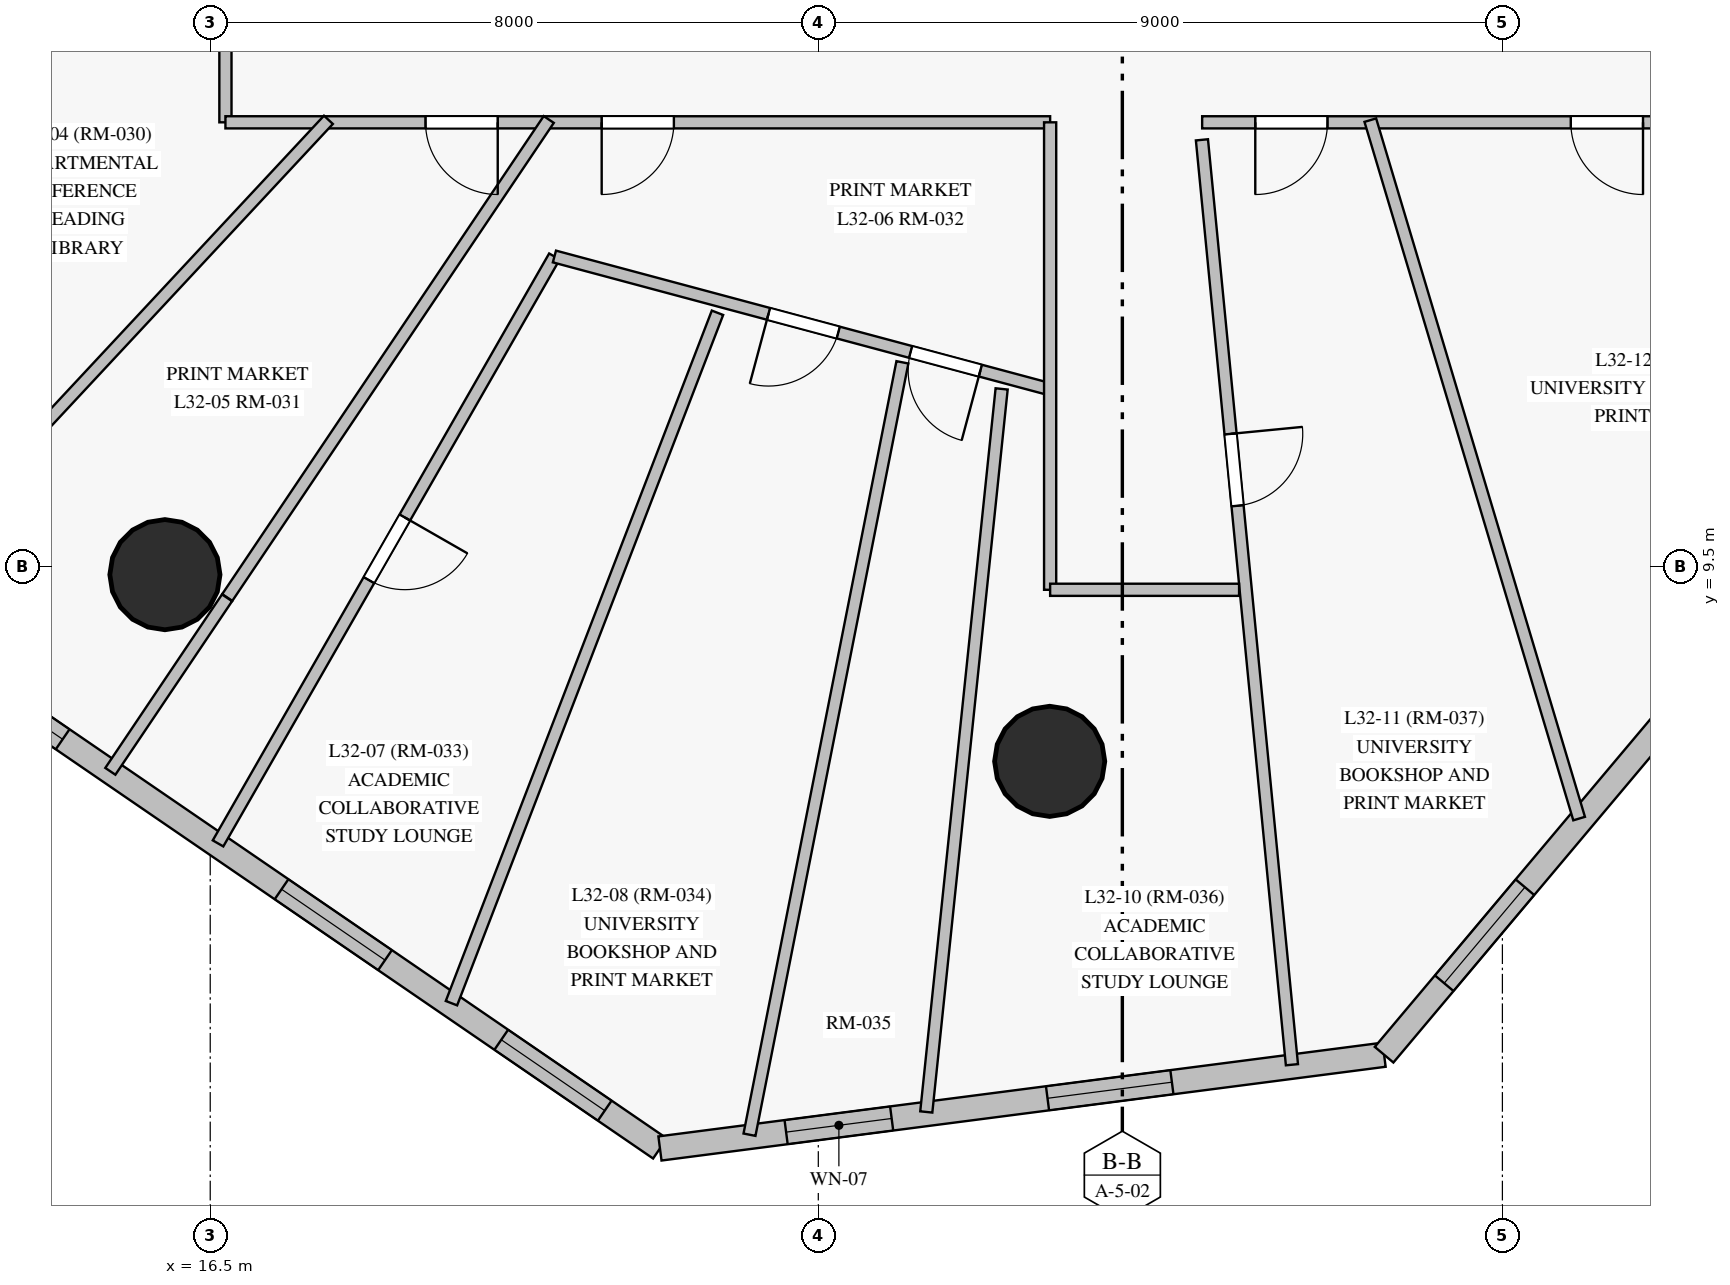
"""IFC4 building model, lengths in metres.
Left out: names, types, materials, properties, quantities, classifications, styles, units other than length and angle.
Written with IfcOpenShell. Run it as: python <this file> out.ifc"""

import sys

from ifc_helpers import new_model, si_unit, direction, frame, frame_2d, origin, origin_with_axes, origin_2d, place, context, subcontext, project, spatial, rectangle, circle, extrude, source, transform, mapped, element, fill, save


model = new_model("IFC4")
c1 = context("Model", 3, precision=1e-05, world=origin(), true_north=direction((0.0, 1.0)))
c2 = subcontext(c1, "Body", "Model", "MODEL_VIEW")
j1 = project(units=[si_unit("LENGTHUNIT", "METRE"), si_unit("PLANEANGLEUNIT", "RADIAN")], contexts=[c1])
p1 = place(None, origin())
s1 = spatial("IfcSite", under=j1, at=p1, CompositionType="ELEMENT")
p2 = place(p1, origin())
s2 = spatial("IfcBuilding", under=s1, at=p2, CompositionType="ELEMENT")
p3 = place(p2, frame((0.0, 0.0, 117.55)))
s3 = spatial("IfcBuildingStorey", under=s2, at=p3, CompositionType="ELEMENT", Elevation=117.55)
m1 = source(origin_with_axes(), c2, "Body", "SweptSolid", [
    extrude(circle(Radius=0.725, at=origin_2d()), origin(), (0.0, 0.0, 1.0), 3.05),
])
for number, where, z_axis, x_axis in (
    (1, (15.904, 9.399, 0.0), (0.0, 0.0, 1.0), (1.0, 0.0, 0.0)),
    (2, (27.544, 6.943, 0.0), (0.0, 0.0, 1.0), (1.0, 0.0, 0.0)),
):
    element("IfcColumn", number, at=place(p3, frame(where, z_axis=z_axis, x_axis=x_axis)), inside=s3, PredefinedType="COLUMN", context=c2, shape_type="MappedRepresentation", body=[
        mapped(m1, transform((0.0, 0.0, 0.0), scale=1.0)),
    ])
p4 = place(p3, frame((12.525, 8.627, 0.0), z_axis=(0.0, 0.0, 1.0), x_axis=(0.824983002795, -0.565157540071, 0.0)))
e3 = element("IfcWall", 3, at=p4, inside=s3, PredefinedType="SOLIDWALL", context=c2, shape_type="SweptSolid", body=[
    extrude(rectangle(XDim=11.991, YDim=0.32, at=frame_2d((5.995, 0.0))), origin(), (0.0, 0.0, 1.0), 2.825),
])
p5 = place(p4, frame((0.815, 0.0, 0.85)))
e4 = element("IfcOpeningElement", 4, at=p5, cuts=e3, PredefinedType="OPENING", context=c2, shape_type="SweptSolid", body=[
    extrude(rectangle(XDim=1.65, YDim=1.65, at=frame_2d((0.825, 0.825))), frame((0.0, 0.17, 0.0), z_axis=(0.0, -1.0, 0.0), x_axis=(1.0, 0.0, 0.0)), (0.0, 0.0, 1.0), 0.34),
])
p6 = place(p4, frame((5.956, 0.0, 0.85)))
e5 = element("IfcOpeningElement", 5, at=p6, cuts=e3, PredefinedType="OPENING", context=c2, shape_type="SweptSolid", body=[
    extrude(rectangle(XDim=1.65, YDim=1.65, at=frame_2d((0.825, 0.825))), frame((0.0, 0.17, 0.0), z_axis=(0.0, -1.0, 0.0), x_axis=(1.0, 0.0, 0.0)), (0.0, 0.0, 1.0), 0.34),
])
p7 = place(p4, frame((9.46, 0.0, 0.85)))
e6 = element("IfcOpeningElement", 6, at=p7, cuts=e3, PredefinedType="OPENING", context=c2, shape_type="SweptSolid", body=[
    extrude(rectangle(XDim=1.65, YDim=1.65, at=frame_2d((0.825, 0.825))), frame((0.0, 0.17, 0.0), z_axis=(0.0, -1.0, 0.0), x_axis=(1.0, 0.0, 0.0)), (0.0, 0.0, 1.0), 0.34),
])
p8 = place(p3, frame((22.417, 1.85, 0.0), z_axis=(0.0, 0.0, 1.0), x_axis=(0.991723253877, 0.128393877264, 0.0)))
e7 = element("IfcWall", 7, at=p8, inside=s3, PredefinedType="SOLIDWALL", context=c2, shape_type="SweptSolid", body=[
    extrude(rectangle(XDim=9.606, YDim=0.32, at=frame_2d((4.803, 0.0))), origin(), (0.0, 0.0, 1.0), 2.825),
])
p9 = place(p8, frame((1.674, 0.0, 0.85)))
e8 = element("IfcOpeningElement", 8, at=p9, cuts=e7, PredefinedType="OPENING", context=c2, shape_type="SweptSolid", body=[
    extrude(rectangle(XDim=1.4, YDim=1.65, at=frame_2d((0.7, 0.825))), frame((0.0, 0.17, 0.0), z_axis=(0.0, -1.0, 0.0), x_axis=(1.0, 0.0, 0.0)), (0.0, 0.0, 1.0), 0.34),
])
p10 = place(p8, frame((5.141, 0.0, 0.85)))
e9 = element("IfcOpeningElement", 9, at=p10, cuts=e7, PredefinedType="OPENING", context=c2, shape_type="SweptSolid", body=[
    extrude(rectangle(XDim=1.65, YDim=1.65, at=frame_2d((0.825, 0.825))), frame((0.0, 0.17, 0.0), z_axis=(0.0, -1.0, 0.0), x_axis=(1.0, 0.0, 0.0)), (0.0, 0.0, 1.0), 0.34),
])
p11 = place(p3, frame((31.944, 3.083, 0.0), z_axis=(0.0, 0.0, 1.0), x_axis=(0.643621916948, 0.765343601283, 0.0)))
e10 = element("IfcWall", 10, at=p11, inside=s3, PredefinedType="SOLIDWALL", context=c2, shape_type="SweptSolid", body=[
    extrude(rectangle(XDim=14.343, YDim=0.32, at=frame_2d((7.171, 0.0))), origin(), (0.0, 0.0, 1.0), 2.825),
])
p12 = place(p11, frame((1.229, 0.0, 0.85)))
e11 = element("IfcOpeningElement", 11, at=p12, cuts=e10, PredefinedType="OPENING", context=c2, shape_type="SweptSolid", body=[
    extrude(rectangle(XDim=1.65, YDim=1.65, at=frame_2d((0.825, 0.825))), frame((0.0, 0.17, 0.0), z_axis=(0.0, -1.0, 0.0), x_axis=(1.0, 0.0, 0.0)), (0.0, 0.0, 1.0), 0.34),
])
p13 = place(p11, frame((5.942, 0.0, 0.85)))
e12 = element("IfcOpeningElement", 12, at=p13, cuts=e10, PredefinedType="OPENING", context=c2, shape_type="SweptSolid", body=[
    extrude(rectangle(XDim=1.65, YDim=1.65, at=frame_2d((0.825, 0.825))), frame((0.0, 0.17, 0.0), z_axis=(0.0, -1.0, 0.0), x_axis=(1.0, 0.0, 0.0)), (0.0, 0.0, 1.0), 0.34),
])
p14 = place(p11, frame((10.739, 0.0, 0.85)))
e13 = element("IfcOpeningElement", 13, at=p14, cuts=e10, PredefinedType="OPENING", context=c2, shape_type="SweptSolid", body=[
    extrude(rectangle(XDim=1.65, YDim=1.65, at=frame_2d((0.825, 0.825))), frame((0.0, 0.17, 0.0), z_axis=(0.0, -1.0, 0.0), x_axis=(1.0, 0.0, 0.0)), (0.0, 0.0, 1.0), 0.34),
])
p15 = place(p3, frame((16.7, 15.35, 0.0), z_axis=(0.0, 0.0, 1.0), x_axis=(0.0, 1.0, 0.0)))
e14 = element("IfcWall", 14, at=p15, inside=s3, PredefinedType="PARTITIONING", context=c2, shape_type="SweptSolid", body=[
    extrude(rectangle(XDim=22.3, YDim=0.16, at=frame_2d((11.15, 0.0))), origin(), (0.0, 0.0, 1.0), 2.225),
])
p16 = place(p15, frame((10.675, 0.0, 0.0)))
e15 = element("IfcOpeningElement", 15, at=p16, cuts=e14, PredefinedType="OPENING", context=c2, shape_type="SweptSolid", body=[
    extrude(rectangle(XDim=0.95, YDim=2.15, at=frame_2d((0.475, 1.075))), frame((0.0, 0.09, 0.0), z_axis=(0.0, -1.0, 0.0), x_axis=(1.0, 0.0, 0.0)), (0.0, 0.0, 1.0), 0.18),
])
p17 = place(p15, frame((0.963, 0.0, 0.0)))
e16 = element("IfcOpeningElement", 16, at=p17, cuts=e14, PredefinedType="OPENING", context=c2, shape_type="SweptSolid", body=[
    extrude(rectangle(XDim=0.95, YDim=2.15, at=frame_2d((0.475, 1.075))), frame((0.0, 0.09, 0.0), z_axis=(0.0, -1.0, 0.0), x_axis=(1.0, 0.0, 0.0)), (0.0, 0.0, 1.0), 0.18),
])
p18 = place(p15, frame((14.02, 0.0, 0.0)))
e17 = element("IfcOpeningElement", 17, at=p18, cuts=e14, PredefinedType="OPENING", context=c2, shape_type="SweptSolid", body=[
    extrude(rectangle(XDim=0.95, YDim=2.15, at=frame_2d((0.475, 1.075))), frame((0.0, 0.09, 0.0), z_axis=(0.0, -1.0, 0.0), x_axis=(1.0, 0.0, 0.0)), (0.0, 0.0, 1.0), 0.18),
])
p19 = place(p3, frame((29.547, 15.12, 0.0), z_axis=(0.0, 0.0, 1.0), x_axis=(0.096855822721, -0.995298422387, 0.0)))
e18 = element("IfcWall", 18, at=p19, inside=s3, PredefinedType="PARTITIONING", context=c2, shape_type="SweptSolid", body=[
    extrude(rectangle(XDim=12.225, YDim=0.16, at=frame_2d((6.113, 0.0))), origin(), (0.0, 0.0, 1.0), 2.825),
])
p20 = place(p19, frame((3.887, 0.0, 0.0)))
e19 = element("IfcOpeningElement", 19, at=p20, cuts=e18, PredefinedType="OPENING", context=c2, shape_type="SweptSolid", body=[
    extrude(rectangle(XDim=0.95, YDim=2.15, at=frame_2d((0.475, 1.075))), frame((0.0, 0.09, 0.0), z_axis=(0.0, -1.0, 0.0), x_axis=(1.0, 0.0, 0.0)), (0.0, 0.0, 1.0), 0.18),
])
p21 = place(p3, frame((27.55, 15.35, 0.0), z_axis=(0.0, 0.0, 1.0), x_axis=(-1.0, 0.0, 0.0)))
e20 = element("IfcWall", 20, at=p21, inside=s3, PredefinedType="PARTITIONING", context=c2, shape_type="SweptSolid", body=[
    extrude(rectangle(XDim=10.85, YDim=0.16, at=frame_2d((5.425, 0.0))), origin(), (0.0, 0.0, 1.0), 2.325),
])
p22 = place(p21, frame((7.268, 0.0, 0.0)))
e21 = element("IfcOpeningElement", 21, at=p22, cuts=e20, PredefinedType="OPENING", context=c2, shape_type="SweptSolid", body=[
    extrude(rectangle(XDim=0.95, YDim=2.15, at=frame_2d((0.475, 1.075))), frame((0.0, 0.09, 0.0), z_axis=(0.0, -1.0, 0.0), x_axis=(1.0, 0.0, 0.0)), (0.0, 0.0, 1.0), 0.18),
])
p23 = place(p21, frame((4.95, 0.0, 0.0)))
e22 = element("IfcOpeningElement", 22, at=p23, cuts=e20, PredefinedType="OPENING", context=c2, shape_type="SweptSolid", body=[
    extrude(rectangle(XDim=0.95, YDim=2.15, at=frame_2d((0.475, 1.075))), frame((0.0, 0.09, 0.0), z_axis=(0.0, -1.0, 0.0), x_axis=(1.0, 0.0, 0.0)), (0.0, 0.0, 1.0), 0.18),
])
p24 = place(p3, frame((40.2, 15.35, 0.0), z_axis=(0.0, 0.0, 1.0), x_axis=(-1.0, 0.0, 0.0)))
e23 = element("IfcWall", 23, at=p24, inside=s3, PredefinedType="PARTITIONING", context=c2, shape_type="SweptSolid", body=[
    extrude(rectangle(XDim=10.65, YDim=0.16, at=frame_2d((5.325, 0.0))), origin(), (0.0, 0.0, 1.0), 2.225),
])
p25 = place(p24, frame((9.001, 0.0, 0.0)))
e24 = element("IfcOpeningElement", 24, at=p25, cuts=e23, PredefinedType="OPENING", context=c2, shape_type="SweptSolid", body=[
    extrude(rectangle(XDim=0.95, YDim=2.15, at=frame_2d((0.475, 1.075))), frame((0.0, 0.09, 0.0), z_axis=(0.0, -1.0, 0.0), x_axis=(1.0, 0.0, 0.0)), (0.0, 0.0, 1.0), 0.18),
])
p26 = place(p24, frame((4.85, 0.0, 0.0)))
e25 = element("IfcOpeningElement", 25, at=p26, cuts=e23, PredefinedType="OPENING", context=c2, shape_type="SweptSolid", body=[
    extrude(rectangle(XDim=0.95, YDim=2.15, at=frame_2d((0.475, 1.075))), frame((0.0, 0.09, 0.0), z_axis=(0.0, -1.0, 0.0), x_axis=(1.0, 0.0, 0.0)), (0.0, 0.0, 1.0), 0.18),
])
p27 = place(p3, frame((25.606, 12.193, 0.0), z_axis=(0.0, 0.0, 1.0), x_axis=(-0.194207590837, -0.980960453668, 0.0)))
e26 = element("IfcWall", 26, at=p27, inside=s3, PredefinedType="PARTITIONING", context=c2, shape_type="SweptSolid", body=[
    extrude(rectangle(XDim=10.359, YDim=0.16, at=frame_2d((5.179, 0.0))), origin(), (0.0, 0.0, 1.0), 2.825),
])
p28 = place(p3, frame((23.174, 12.844, 0.0), z_axis=(0.0, 0.0, 1.0), x_axis=(-0.359563891754, -0.933120467971, 0.0)))
e27 = element("IfcWall", 27, at=p28, inside=s3, PredefinedType="PARTITIONING", context=c2, shape_type="SweptSolid", body=[
    extrude(rectangle(XDim=9.734, YDim=0.16, at=frame_2d((4.867, 0.0))), origin(), (0.0, 0.0, 1.0), 2.825),
])
p29 = place(p3, frame((31.762, 15.379, 0.0), z_axis=(0.0, 0.0, 1.0), x_axis=(0.286457964324, -0.958092811097, 0.0)))
e28 = element("IfcWall", 28, at=p29, inside=s3, PredefinedType="PARTITIONING", context=c2, shape_type="SweptSolid", body=[
    extrude(rectangle(XDim=9.591, YDim=0.16, at=frame_2d((4.795, 0.0))), origin(), (0.0, 0.0, 1.0), 2.825),
])
p30 = place(p3, frame((26.912, 11.843, 0.0), z_axis=(0.0, 0.0, 1.0), x_axis=(-0.103642912632, -0.994614571913, 0.0)))
e29 = element("IfcWall", 29, at=p30, inside=s3, PredefinedType="PARTITIONING", context=c2, shape_type="SweptSolid", body=[
    extrude(rectangle(XDim=9.564, YDim=0.16, at=frame_2d((4.782, 0.0))), origin(), (0.0, 0.0, 1.0), 2.225),
])
p31 = place(p3, frame((21.028, 13.585, 0.0), z_axis=(0.0, 0.0, 1.0), x_axis=(-0.497264087077, -0.867599232194, 0.0)))
e30 = element("IfcWall", 30, at=p31, inside=s3, PredefinedType="PARTITIONING", context=c2, shape_type="SweptSolid", body=[
    extrude(rectangle(XDim=8.9, YDim=0.16, at=frame_2d((4.45, 0.0))), origin(), (0.0, 0.0, 1.0), 2.825),
])
p32 = place(p31, frame((3.958, 0.0, 0.0)))
e31 = element("IfcOpeningElement", 31, at=p32, cuts=e30, PredefinedType="OPENING", context=c2, shape_type="SweptSolid", body=[
    extrude(rectangle(XDim=0.95, YDim=2.15, at=frame_2d((0.475, 1.075))), frame((0.0, 0.09, 0.0), z_axis=(0.0, -1.0, 0.0), x_axis=(1.0, 0.0, 0.0)), (0.0, 0.0, 1.0), 0.18),
])
p33 = place(p3, frame((18.055, 15.383, 0.0), z_axis=(0.0, 0.0, 1.0), x_axis=(-0.6818672514, -0.731475940458, 0.0)))
e32 = element("IfcWall", 32, at=p33, inside=s3, PredefinedType="PARTITIONING", context=c2, shape_type="SweptSolid", body=[
    extrude(rectangle(XDim=8.47, YDim=0.16, at=frame_2d((4.235, 0.0))), origin(), (0.0, 0.0, 1.0), 2.225),
])
p34 = place(p3, frame((20.954, 15.387, 0.0), z_axis=(0.0, 0.0, 1.0), x_axis=(-0.558085558464, -0.829783411159, 0.0)))
e33 = element("IfcWall", 33, at=p34, inside=s3, PredefinedType="PARTITIONING", context=c2, shape_type="SweptSolid", body=[
    extrude(rectangle(XDim=7.579, YDim=0.16, at=frame_2d((3.789, 0.0))), origin(), (0.0, 0.0, 1.0), 2.825),
])
p35 = place(p3, frame((27.579, 11.83, 0.0), z_axis=(0.0, 0.0, 1.0), x_axis=(-0.96592234089, 0.258832052437, 0.0)))
e34 = element("IfcWall", 34, at=p35, inside=s3, PredefinedType="PARTITIONING", context=c2, shape_type="SweptSolid", body=[
    extrude(rectangle(XDim=6.782, YDim=0.16, at=frame_2d((3.391, 0.0))), origin(), (0.0, 0.0, 1.0), 2.325),
])
p36 = place(p35, frame((2.916, 0.0, 0.0)))
e35 = element("IfcOpeningElement", 35, at=p36, cuts=e34, PredefinedType="OPENING", context=c2, shape_type="SweptSolid", body=[
    extrude(rectangle(XDim=0.95, YDim=2.15, at=frame_2d((0.475, 1.075))), frame((0.0, 0.09, 0.0), z_axis=(0.0, -1.0, 0.0), x_axis=(1.0, 0.0, 0.0)), (0.0, 0.0, 1.0), 0.18),
])
p37 = place(p35, frame((0.98, 0.0, 0.0)))
e36 = element("IfcOpeningElement", 36, at=p37, cuts=e34, PredefinedType="OPENING", context=c2, shape_type="SweptSolid", body=[
    extrude(rectangle(XDim=0.95, YDim=2.15, at=frame_2d((0.475, 1.075))), frame((0.0, 0.09, 0.0), z_axis=(0.0, -1.0, 0.0), x_axis=(1.0, 0.0, 0.0)), (0.0, 0.0, 1.0), 0.18),
])
p38 = place(p3, frame((27.55, 9.2, 0.0), z_axis=(0.0, 0.0, 1.0), x_axis=(0.0, 1.0, 0.0)))
e37 = element("IfcWall", 37, at=p38, inside=s3, PredefinedType="PARTITIONING", context=c2, shape_type="SweptSolid", body=[
    extrude(rectangle(XDim=6.15, YDim=0.16, at=frame_2d((3.075, 0.0))), origin(), (0.0, 0.0, 1.0), 2.225),
])
p39 = place(p3, frame((16.725, 18.523, 0.0), z_axis=(0.0, 0.0, 1.0), x_axis=(-0.825538633176, -0.564345607881, 0.0)))
e38 = element("IfcWall", 38, at=p39, inside=s3, PredefinedType="PARTITIONING", context=c2, shape_type="SweptSolid", body=[
    extrude(rectangle(XDim=5.848, YDim=0.16, at=frame_2d((2.924, 0.0))), origin(), (0.0, 0.0, 1.0), 2.825),
])
p40 = place(p3, frame((16.721, 9.094, 0.0), z_axis=(0.0, 0.0, 1.0), x_axis=(-0.558054489586, -0.829804306239, 0.0)))
e39 = element("IfcWall", 39, at=p40, inside=s3, PredefinedType="PARTITIONING", context=c2, shape_type="SweptSolid", body=[
    extrude(rectangle(XDim=2.751, YDim=0.16, at=frame_2d((1.375, 0.0))), origin(), (0.0, 0.0, 1.0), 2.825),
])
p41 = place(p3, frame((30.036, 9.2, 0.0), z_axis=(0.0, 0.0, 1.0), x_axis=(-1.0, 0.0, 0.0)))
e40 = element("IfcWall", 40, at=p41, inside=s3, PredefinedType="PARTITIONING", context=c2, shape_type="SweptSolid", body=[
    extrude(rectangle(XDim=2.486, YDim=0.16, at=frame_2d((1.243, 0.0))), origin(), (0.0, 0.0, 1.0), 2.225),
])
m2 = source(origin_with_axes(), c2, "Body", "SweptSolid", [
    extrude(rectangle(XDim=1.65, YDim=1.65, at=frame_2d((0.825, 0.825))), frame((0.0, 0.03, 0.0), z_axis=(0.0, -1.0, 0.0), x_axis=(1.0, 0.0, 0.0)), (0.0, 0.0, 1.0), 0.06),
])
p42 = place(p5, origin())
e41 = element("IfcWindow", 41, at=p42, inside=s3, PartitioningType="SINGLE_PANEL", PredefinedType="WINDOW", context=c2, shape_type="MappedRepresentation", body=[
    mapped(m2, transform((0.0, 0.0, 0.0), scale=1.0)),
])
fill(e4, e41)
p43 = place(p6, origin())
e42 = element("IfcWindow", 42, at=p43, inside=s3, PartitioningType="SINGLE_PANEL", PredefinedType="WINDOW", context=c2, shape_type="MappedRepresentation", body=[
    mapped(m2, transform((0.0, 0.0, 0.0), scale=1.0)),
])
fill(e5, e42)
p44 = place(p7, origin())
e43 = element("IfcWindow", 43, at=p44, inside=s3, PartitioningType="SINGLE_PANEL", PredefinedType="WINDOW", context=c2, shape_type="MappedRepresentation", body=[
    mapped(m2, transform((0.0, 0.0, 0.0), scale=1.0)),
])
fill(e6, e43)
m3 = source(origin_with_axes(), c2, "Body", "SweptSolid", [
    extrude(rectangle(XDim=1.4, YDim=1.65, at=frame_2d((0.7, 0.825))), frame((0.0, 0.03, 0.0), z_axis=(0.0, -1.0, 0.0), x_axis=(1.0, 0.0, 0.0)), (0.0, 0.0, 1.0), 0.06),
])
p45 = place(p9, origin())
e44 = element("IfcWindow", 44, at=p45, inside=s3, PartitioningType="SINGLE_PANEL", PredefinedType="WINDOW", context=c2, shape_type="MappedRepresentation", body=[
    mapped(m3, transform((0.0, 0.0, 0.0), scale=1.0)),
])
fill(e8, e44)
p46 = place(p10, origin())
e45 = element("IfcWindow", 45, at=p46, inside=s3, PartitioningType="SINGLE_PANEL", PredefinedType="WINDOW", context=c2, shape_type="MappedRepresentation", body=[
    mapped(m2, transform((0.0, 0.0, 0.0), scale=1.0)),
])
fill(e9, e45)
p47 = place(p12, origin())
e46 = element("IfcWindow", 46, at=p47, inside=s3, PartitioningType="SINGLE_PANEL", PredefinedType="WINDOW", context=c2, shape_type="MappedRepresentation", body=[
    mapped(m2, transform((0.0, 0.0, 0.0), scale=1.0)),
])
fill(e11, e46)
m4 = source(origin_with_axes(), c2, "Body", "SweptSolid", [
    extrude(rectangle(XDim=0.95, YDim=2.15, at=frame_2d((0.475, 1.075))), frame((0.0, 0.025, 0.0), z_axis=(0.0, -1.0, 0.0), x_axis=(1.0, 0.0, 0.0)), (0.0, 0.0, 1.0), 0.05),
])
p48 = place(p22, origin())
e47 = element("IfcDoor", 47, at=p48, inside=s3, OperationType="SINGLE_SWING_LEFT", PredefinedType="DOOR", context=c2, shape_type="MappedRepresentation", body=[
    mapped(m4, transform((0.0, 0.0, 0.0), scale=1.0)),
])
fill(e21, e47)
p49 = place(p23, origin())
e48 = element("IfcDoor", 48, at=p49, inside=s3, OperationType="SINGLE_SWING_RIGHT", PredefinedType="DOOR", context=c2, shape_type="MappedRepresentation", body=[
    mapped(m4, transform((0.0, 0.0, 0.0), scale=1.0)),
])
fill(e22, e48)
p50 = place(p20, origin())
e49 = element("IfcDoor", 49, at=p50, inside=s3, OperationType="SINGLE_SWING_LEFT", PredefinedType="DOOR", context=c2, shape_type="MappedRepresentation", body=[
    mapped(m4, transform((0.0, 0.0, 0.0), scale=1.0)),
])
fill(e19, e49)
p51 = place(p25, origin())
e50 = element("IfcDoor", 50, at=p51, inside=s3, OperationType="SINGLE_SWING_RIGHT", PredefinedType="DOOR", context=c2, shape_type="MappedRepresentation", body=[
    mapped(m4, transform((0.0, 0.0, 0.0), scale=1.0)),
])
fill(e24, e50)
p52 = place(p26, origin())
e51 = element("IfcDoor", 51, at=p52, inside=s3, OperationType="SINGLE_SWING_LEFT", PredefinedType="DOOR", context=c2, shape_type="MappedRepresentation", body=[
    mapped(m4, transform((0.0, 0.0, 0.0), scale=1.0)),
])
fill(e25, e51)
p53 = place(p32, origin())
e52 = element("IfcDoor", 52, at=p53, inside=s3, OperationType="SINGLE_SWING_LEFT", PredefinedType="DOOR", context=c2, shape_type="MappedRepresentation", body=[
    mapped(m4, transform((0.0, 0.0, 0.0), scale=1.0)),
])
fill(e31, e52)
p54 = place(p36, origin())
e53 = element("IfcDoor", 53, at=p54, inside=s3, OperationType="SINGLE_SWING_RIGHT", PredefinedType="DOOR", context=c2, shape_type="MappedRepresentation", body=[
    mapped(m4, transform((0.0, 0.0, 0.0), scale=1.0)),
])
fill(e35, e53)
p55 = place(p37, origin())
e54 = element("IfcDoor", 54, at=p55, inside=s3, OperationType="SINGLE_SWING_LEFT", PredefinedType="DOOR", context=c2, shape_type="MappedRepresentation", body=[
    mapped(m4, transform((0.0, 0.0, 0.0), scale=1.0)),
])
fill(e36, e54)
save(model, sys.argv[1])
